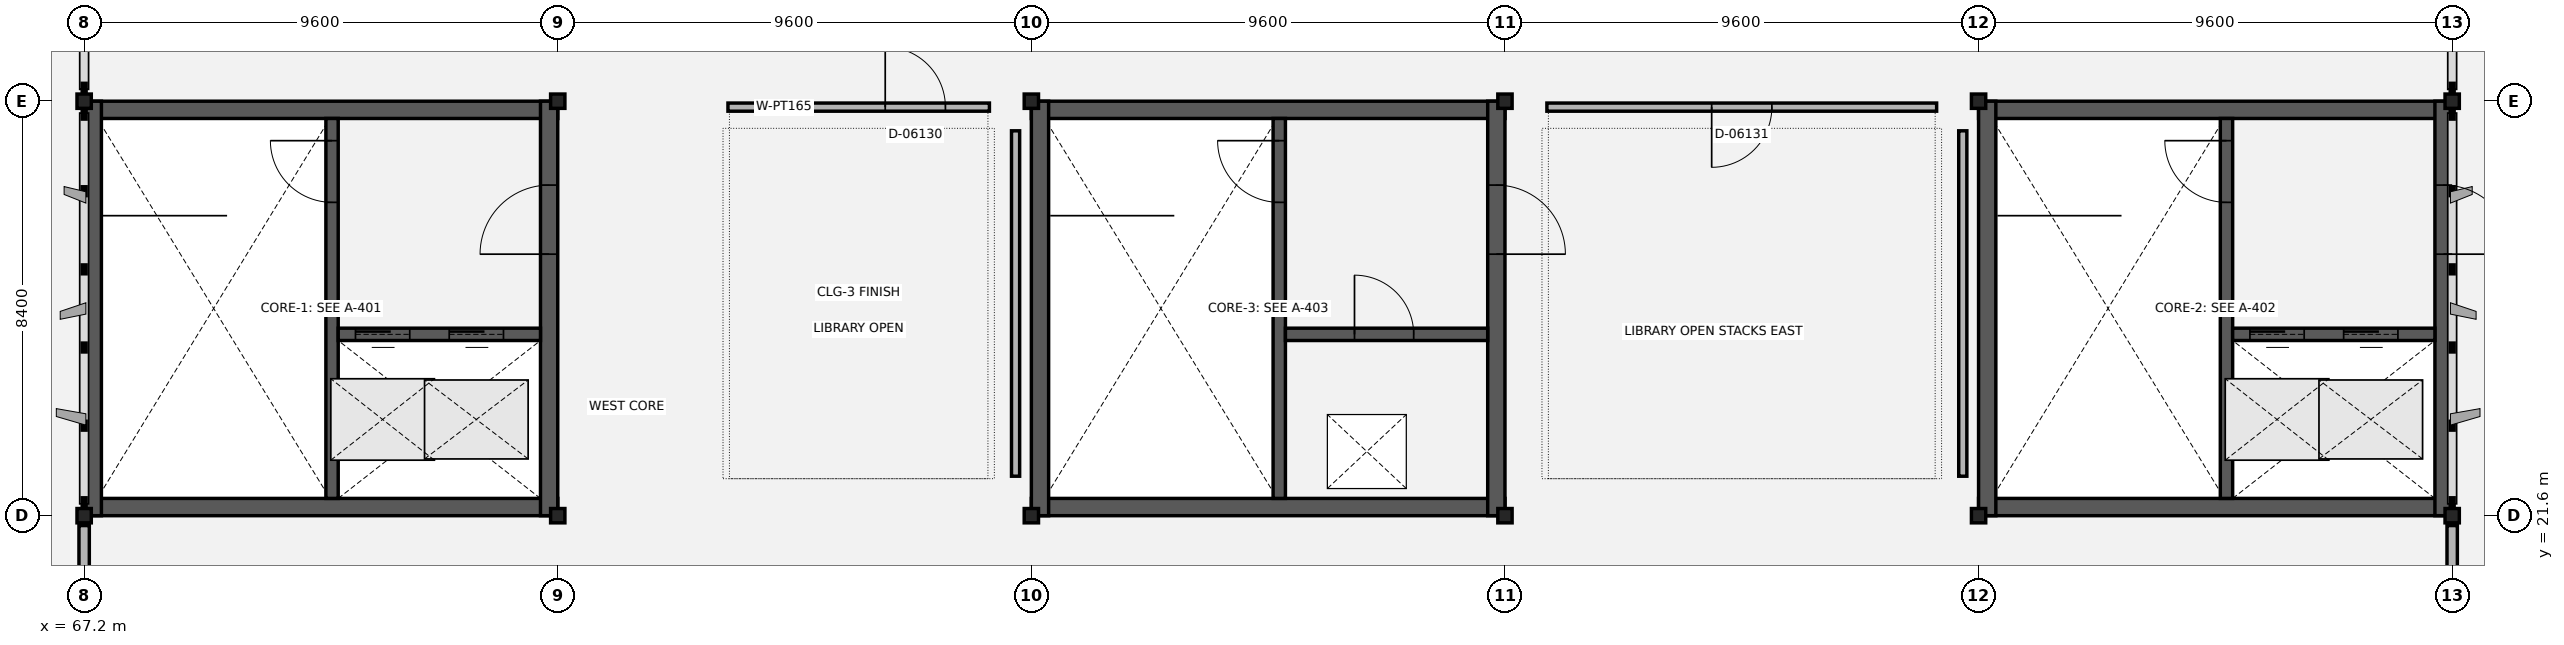
"""IFC4 building model, lengths in metres.
Left out: names, types, materials, properties, quantities, classifications, styles, units other than length and angle.
Written with IfcOpenShell. Run it as: python <this file> out.ifc"""

import sys

from ifc_helpers import new_model, si_unit, direction, frame, frame_2d, origin, origin_2d, place, context, subcontext, project, spatial, rectangle, extrude, element, fill, save


model = new_model("IFC4")
c1 = context("Model", 3, precision=1e-05, world=origin(), true_north=direction((0.0, 1.0)))
c2 = subcontext(c1, "Body", "Model", "MODEL_VIEW")
j1 = project(units=[si_unit("LENGTHUNIT", "METRE"), si_unit("PLANEANGLEUNIT", "RADIAN")], contexts=[c1])
p1 = place(None, origin())
s1 = spatial("IfcSite", under=j1, at=p1, CompositionType="ELEMENT")
p2 = place(p1, origin())
s2 = spatial("IfcBuilding", under=s1, at=p2, CompositionType="ELEMENT")
p3 = place(p2, frame((0.0, 0.0, 27.0)))
s3 = spatial("IfcBuildingStorey", under=s2, at=p3, CompositionType="ELEMENT", Elevation=27.0)
for number, where, z_axis, x_axis in (
    (1, (67.2, 21.6, 0.0), (0.0, 0.0, 1.0), (1.0, 0.0, 0.0)),
    (2, (67.2, 30.0, 0.0), (0.0, 0.0, 1.0), (1.0, 0.0, 0.0)),
    (3, (76.8, 21.6, 0.0), (0.0, 0.0, 1.0), (1.0, 0.0, 0.0)),
    (4, (76.8, 30.0, 0.0), (0.0, 0.0, 1.0), (1.0, 0.0, 0.0)),
    (5, (86.4, 21.6, 0.0), (0.0, 0.0, 1.0), (1.0, 0.0, 0.0)),
    (6, (86.4, 30.0, 0.0), (0.0, 0.0, 1.0), (1.0, 0.0, 0.0)),
    (7, (96.0, 21.6, 0.0), (0.0, 0.0, 1.0), (1.0, 0.0, 0.0)),
    (8, (96.0, 30.0, 0.0), (0.0, 0.0, 1.0), (1.0, 0.0, 0.0)),
    (9, (105.6, 21.6, 0.0), (0.0, 0.0, 1.0), (1.0, 0.0, 0.0)),
    (10, (105.6, 30.0, 0.0), (0.0, 0.0, 1.0), (1.0, 0.0, 0.0)),
    (11, (115.2, 21.6, 0.0), (0.0, 0.0, 1.0), (1.0, 0.0, 0.0)),
    (12, (115.2, 30.0, 0.0), (0.0, 0.0, 1.0), (1.0, 0.0, 0.0)),
):
    element("IfcColumn", number, at=place(p3, frame(where, z_axis=z_axis, x_axis=x_axis)), inside=s3, PredefinedType="COLUMN", context=c2, shape_type="SweptSolid", body=[
        extrude(rectangle(XDim=0.29, YDim=0.29, at=origin_2d()), origin(), (0.0, 0.0, 1.0), 4.8),
    ])
p4 = place(p3, frame((67.2, 21.4, 0.0), z_axis=(0.0, 0.0, 1.0), x_axis=(0.0, -1.0, 0.0)))
e13 = element("IfcWall", 13, at=p4, inside=s3, PredefinedType="SOLIDWALL", context=c2, shape_type="SweptSolid", body=[
    extrude(rectangle(XDim=8.0, YDim=0.21, at=frame_2d((4.0, 0.0))), origin(), (0.0, 0.0, 1.0), 3.965),
])
p5 = place(p4, frame((3.4, 0.0, 0.0)))
e14 = element("IfcOpeningElement", 14, at=p5, cuts=e13, PredefinedType="OPENING", context=c2, shape_type="SweptSolid", body=[
    extrude(rectangle(XDim=1.2, YDim=2.15, at=frame_2d((0.6, 1.075))), frame((0.0, 0.115, 0.0), z_axis=(0.0, -1.0, 0.0), x_axis=(1.0, 0.0, 0.0)), (0.0, 0.0, 1.0), 0.23),
])
p6 = place(p3, frame((115.2, 13.4, 0.0), z_axis=(0.0, 0.0, 1.0), x_axis=(0.0, 1.0, 0.0)))
e15 = element("IfcWall", 15, at=p6, inside=s3, PredefinedType="SOLIDWALL", context=c2, shape_type="SweptSolid", body=[
    extrude(rectangle(XDim=8.0, YDim=0.21, at=frame_2d((4.0, 0.0))), origin(), (0.0, 0.0, 1.0), 3.965),
])
p7 = place(p6, frame((3.4, 0.0, 0.0)))
e16 = element("IfcOpeningElement", 16, at=p7, cuts=e15, PredefinedType="OPENING", context=c2, shape_type="SweptSolid", body=[
    extrude(rectangle(XDim=1.2, YDim=2.15, at=frame_2d((0.6, 1.075))), frame((0.0, 0.115, 0.0), z_axis=(0.0, -1.0, 0.0), x_axis=(1.0, 0.0, 0.0)), (0.0, 0.0, 1.0), 0.23),
])
for number, where, z_axis, x_axis in (
    (17, (67.2, 29.825, 0.0), (0.0, 0.0, 1.0), (1.0, 0.0, 0.0)),
    (18, (67.2, 21.775, 0.0), (0.0, 0.0, 1.0), (1.0, 0.0, 0.0)),
):
    element("IfcWall", number, at=place(p3, frame(where, z_axis=z_axis, x_axis=x_axis)), inside=s3, PredefinedType="SHEAR", context=c2, shape_type="SweptSolid", body=[
        extrude(rectangle(XDim=9.6, YDim=0.35, at=frame_2d((4.8, 0.0))), origin(), (0.0, 0.0, 1.0), 4.565),
    ])
p8 = place(p3, frame((67.375, 21.6, 0.0), z_axis=(0.0, 0.0, 1.0), x_axis=(0.0, 1.0, 0.0)))
e19 = element("IfcWall", 19, at=p8, inside=s3, PredefinedType="SHEAR", context=c2, shape_type="SweptSolid", body=[
    extrude(rectangle(XDim=8.4, YDim=0.35, at=frame_2d((4.2, 0.0))), origin(), (0.0, 0.0, 1.0), 4.565),
])
p9 = place(p3, frame((76.625, 21.6, 0.0), z_axis=(0.0, 0.0, 1.0), x_axis=(0.0, 1.0, 0.0)))
e20 = element("IfcWall", 20, at=p9, inside=s3, PredefinedType="SHEAR", context=c2, shape_type="SweptSolid", body=[
    extrude(rectangle(XDim=8.4, YDim=0.35, at=frame_2d((4.2, 0.0))), origin(), (0.0, 0.0, 1.0), 4.565),
])
p10 = place(p9, frame((5.3, 0.0, 0.0)))
e21 = element("IfcOpeningElement", 21, at=p10, cuts=e20, PredefinedType="OPENING", context=c2, shape_type="SweptSolid", body=[
    extrude(rectangle(XDim=1.4, YDim=2.15, at=frame_2d((0.7, 1.075))), frame((0.0, 0.185, 0.0), z_axis=(0.0, -1.0, 0.0), x_axis=(1.0, 0.0, 0.0)), (0.0, 0.0, 1.0), 0.37),
])
p11 = place(p3, frame((72.225, 29.65, 0.0), z_axis=(0.0, 0.0, 1.0), x_axis=(0.0, -1.0, 0.0)))
e22 = element("IfcWall", 22, at=p11, inside=s3, PredefinedType="SHEAR", context=c2, shape_type="SweptSolid", body=[
    extrude(rectangle(XDim=7.7, YDim=0.25, at=frame_2d((3.85, 0.0))), origin(), (0.0, 0.0, 1.0), 4.565),
])
p12 = place(p11, frame((0.45, 0.0, 0.0)))
e23 = element("IfcOpeningElement", 23, at=p12, cuts=e22, PredefinedType="OPENING", context=c2, shape_type="SweptSolid", body=[
    extrude(rectangle(XDim=1.25, YDim=2.15, at=frame_2d((0.625, 1.075))), frame((0.0, 0.135, 0.0), z_axis=(0.0, -1.0, 0.0), x_axis=(1.0, 0.0, 0.0)), (0.0, 0.0, 1.0), 0.27),
])
p13 = place(p3, frame((72.35, 25.275, 0.0), z_axis=(0.0, 0.0, 1.0), x_axis=(1.0, 0.0, 0.0)))
e24 = element("IfcWall", 24, at=p13, inside=s3, PredefinedType="SHEAR", context=c2, shape_type="SweptSolid", body=[
    extrude(rectangle(XDim=4.1, YDim=0.25, at=frame_2d((2.05, 0.0))), origin(), (0.0, 0.0, 1.0), 4.565),
])
p14 = place(p13, frame((0.35, 0.0, 0.0)))
e25 = element("IfcOpeningElement", 25, at=p14, cuts=e24, PredefinedType="OPENING", context=c2, shape_type="SweptSolid", body=[
    extrude(rectangle(XDim=1.1, YDim=2.15, at=frame_2d((0.55, 1.075))), frame((0.0, 0.135, 0.0), z_axis=(0.0, -1.0, 0.0), x_axis=(1.0, 0.0, 0.0)), (0.0, 0.0, 1.0), 0.27),
])
p15 = place(p13, frame((2.25, 0.0, 0.0)))
e26 = element("IfcOpeningElement", 26, at=p15, cuts=e24, PredefinedType="OPENING", context=c2, shape_type="SweptSolid", body=[
    extrude(rectangle(XDim=1.1, YDim=2.15, at=frame_2d((0.55, 1.075))), frame((0.0, 0.135, 0.0), z_axis=(0.0, -1.0, 0.0), x_axis=(1.0, 0.0, 0.0)), (0.0, 0.0, 1.0), 0.27),
])
for number, where, z_axis, x_axis in (
    (27, (105.6, 29.825, 0.0), (0.0, 0.0, 1.0), (1.0, 0.0, 0.0)),
    (28, (105.6, 21.775, 0.0), (0.0, 0.0, 1.0), (1.0, 0.0, 0.0)),
):
    element("IfcWall", number, at=place(p3, frame(where, z_axis=z_axis, x_axis=x_axis)), inside=s3, PredefinedType="SHEAR", context=c2, shape_type="SweptSolid", body=[
        extrude(rectangle(XDim=9.6, YDim=0.35, at=frame_2d((4.8, 0.0))), origin(), (0.0, 0.0, 1.0), 4.565),
    ])
p16 = place(p3, frame((105.775, 21.6, 0.0), z_axis=(0.0, 0.0, 1.0), x_axis=(0.0, 1.0, 0.0)))
e29 = element("IfcWall", 29, at=p16, inside=s3, PredefinedType="SHEAR", context=c2, shape_type="SweptSolid", body=[
    extrude(rectangle(XDim=8.4, YDim=0.35, at=frame_2d((4.2, 0.0))), origin(), (0.0, 0.0, 1.0), 4.565),
])
p17 = place(p3, frame((115.025, 21.6, 0.0), z_axis=(0.0, 0.0, 1.0), x_axis=(0.0, 1.0, 0.0)))
e30 = element("IfcWall", 30, at=p17, inside=s3, PredefinedType="SHEAR", context=c2, shape_type="SweptSolid", body=[
    extrude(rectangle(XDim=8.4, YDim=0.35, at=frame_2d((4.2, 0.0))), origin(), (0.0, 0.0, 1.0), 4.565),
])
p18 = place(p17, frame((5.3, 0.0, 0.0)))
e31 = element("IfcOpeningElement", 31, at=p18, cuts=e30, PredefinedType="OPENING", context=c2, shape_type="SweptSolid", body=[
    extrude(rectangle(XDim=1.4, YDim=2.15, at=frame_2d((0.7, 1.075))), frame((0.0, 0.185, 0.0), z_axis=(0.0, -1.0, 0.0), x_axis=(1.0, 0.0, 0.0)), (0.0, 0.0, 1.0), 0.37),
])
p19 = place(p3, frame((110.625, 29.65, 0.0), z_axis=(0.0, 0.0, 1.0), x_axis=(0.0, -1.0, 0.0)))
e32 = element("IfcWall", 32, at=p19, inside=s3, PredefinedType="SHEAR", context=c2, shape_type="SweptSolid", body=[
    extrude(rectangle(XDim=7.7, YDim=0.25, at=frame_2d((3.85, 0.0))), origin(), (0.0, 0.0, 1.0), 4.565),
])
p20 = place(p19, frame((0.45, 0.0, 0.0)))
e33 = element("IfcOpeningElement", 33, at=p20, cuts=e32, PredefinedType="OPENING", context=c2, shape_type="SweptSolid", body=[
    extrude(rectangle(XDim=1.25, YDim=2.15, at=frame_2d((0.625, 1.075))), frame((0.0, 0.135, 0.0), z_axis=(0.0, -1.0, 0.0), x_axis=(1.0, 0.0, 0.0)), (0.0, 0.0, 1.0), 0.27),
])
p21 = place(p3, frame((110.75, 25.275, 0.0), z_axis=(0.0, 0.0, 1.0), x_axis=(1.0, 0.0, 0.0)))
e34 = element("IfcWall", 34, at=p21, inside=s3, PredefinedType="SHEAR", context=c2, shape_type="SweptSolid", body=[
    extrude(rectangle(XDim=4.1, YDim=0.25, at=frame_2d((2.05, 0.0))), origin(), (0.0, 0.0, 1.0), 4.565),
])
p22 = place(p21, frame((0.35, 0.0, 0.0)))
e35 = element("IfcOpeningElement", 35, at=p22, cuts=e34, PredefinedType="OPENING", context=c2, shape_type="SweptSolid", body=[
    extrude(rectangle(XDim=1.1, YDim=2.15, at=frame_2d((0.55, 1.075))), frame((0.0, 0.135, 0.0), z_axis=(0.0, -1.0, 0.0), x_axis=(1.0, 0.0, 0.0)), (0.0, 0.0, 1.0), 0.27),
])
p23 = place(p21, frame((2.25, 0.0, 0.0)))
e36 = element("IfcOpeningElement", 36, at=p23, cuts=e34, PredefinedType="OPENING", context=c2, shape_type="SweptSolid", body=[
    extrude(rectangle(XDim=1.1, YDim=2.15, at=frame_2d((0.55, 1.075))), frame((0.0, 0.135, 0.0), z_axis=(0.0, -1.0, 0.0), x_axis=(1.0, 0.0, 0.0)), (0.0, 0.0, 1.0), 0.27),
])
for number, where, z_axis, x_axis in (
    (37, (86.4, 29.825, 0.0), (0.0, 0.0, 1.0), (1.0, 0.0, 0.0)),
    (38, (86.4, 21.775, 0.0), (0.0, 0.0, 1.0), (1.0, 0.0, 0.0)),
):
    element("IfcWall", number, at=place(p3, frame(where, z_axis=z_axis, x_axis=x_axis)), inside=s3, PredefinedType="SHEAR", context=c2, shape_type="SweptSolid", body=[
        extrude(rectangle(XDim=9.6, YDim=0.35, at=frame_2d((4.8, 0.0))), origin(), (0.0, 0.0, 1.0), 4.565),
    ])
p24 = place(p3, frame((86.575, 21.6, 0.0), z_axis=(0.0, 0.0, 1.0), x_axis=(0.0, 1.0, 0.0)))
e39 = element("IfcWall", 39, at=p24, inside=s3, PredefinedType="SHEAR", context=c2, shape_type="SweptSolid", body=[
    extrude(rectangle(XDim=8.4, YDim=0.35, at=frame_2d((4.2, 0.0))), origin(), (0.0, 0.0, 1.0), 4.565),
])
p25 = place(p3, frame((95.825, 21.6, 0.0), z_axis=(0.0, 0.0, 1.0), x_axis=(0.0, 1.0, 0.0)))
e40 = element("IfcWall", 40, at=p25, inside=s3, PredefinedType="SHEAR", context=c2, shape_type="SweptSolid", body=[
    extrude(rectangle(XDim=8.4, YDim=0.35, at=frame_2d((4.2, 0.0))), origin(), (0.0, 0.0, 1.0), 4.565),
])
p26 = place(p25, frame((5.3, 0.0, 0.0)))
e41 = element("IfcOpeningElement", 41, at=p26, cuts=e40, PredefinedType="OPENING", context=c2, shape_type="SweptSolid", body=[
    extrude(rectangle(XDim=1.4, YDim=2.15, at=frame_2d((0.7, 1.075))), frame((0.0, 0.185, 0.0), z_axis=(0.0, -1.0, 0.0), x_axis=(1.0, 0.0, 0.0)), (0.0, 0.0, 1.0), 0.37),
])
p27 = place(p3, frame((91.425, 29.65, 0.0), z_axis=(0.0, 0.0, 1.0), x_axis=(0.0, -1.0, 0.0)))
e42 = element("IfcWall", 42, at=p27, inside=s3, PredefinedType="SHEAR", context=c2, shape_type="SweptSolid", body=[
    extrude(rectangle(XDim=7.7, YDim=0.25, at=frame_2d((3.85, 0.0))), origin(), (0.0, 0.0, 1.0), 4.565),
])
p28 = place(p27, frame((0.45, 0.0, 0.0)))
e43 = element("IfcOpeningElement", 43, at=p28, cuts=e42, PredefinedType="OPENING", context=c2, shape_type="SweptSolid", body=[
    extrude(rectangle(XDim=1.25, YDim=2.15, at=frame_2d((0.625, 1.075))), frame((0.0, 0.135, 0.0), z_axis=(0.0, -1.0, 0.0), x_axis=(1.0, 0.0, 0.0)), (0.0, 0.0, 1.0), 0.27),
])
p29 = place(p3, frame((91.55, 25.275, 0.0), z_axis=(0.0, 0.0, 1.0), x_axis=(1.0, 0.0, 0.0)))
e44 = element("IfcWall", 44, at=p29, inside=s3, PredefinedType="SHEAR", context=c2, shape_type="SweptSolid", body=[
    extrude(rectangle(XDim=4.1, YDim=0.25, at=frame_2d((2.05, 0.0))), origin(), (0.0, 0.0, 1.0), 4.565),
])
p30 = place(p29, frame((1.4, 0.0, 0.0)))
e45 = element("IfcOpeningElement", 45, at=p30, cuts=e44, PredefinedType="OPENING", context=c2, shape_type="SweptSolid", body=[
    extrude(rectangle(XDim=1.2, YDim=2.15, at=frame_2d((0.6, 1.075))), frame((0.0, 0.135, 0.0), z_axis=(0.0, -1.0, 0.0), x_axis=(1.0, 0.0, 0.0)), (0.0, 0.0, 1.0), 0.27),
])
p31 = place(p3, frame((80.25, 29.88, 0.0), z_axis=(0.0, 0.0, 1.0), x_axis=(1.0, 0.0, 0.0)))
e46 = element("IfcWall", 46, at=p31, inside=s3, PredefinedType="PARTITIONING", context=c2, shape_type="SweptSolid", body=[
    extrude(rectangle(XDim=5.3, YDim=0.165, at=frame_2d((2.65, 0.0))), origin(), (0.0, 0.0, 1.0), 3.945),
])
p32 = place(p31, frame((3.188, 0.0, 0.0)))
e47 = element("IfcOpeningElement", 47, at=p32, cuts=e46, PredefinedType="OPENING", context=c2, shape_type="SweptSolid", body=[
    extrude(rectangle(XDim=1.22, YDim=2.15, at=frame_2d((0.61, 1.075))), frame((0.0, 0.093, 0.0), z_axis=(0.0, -1.0, 0.0), x_axis=(1.0, 0.0, 0.0)), (0.0, 0.0, 1.0), 0.185),
])
p33 = place(p3, frame((86.08, 22.4, 0.0), z_axis=(0.0, 0.0, 1.0), x_axis=(0.0, 1.0, 0.0)))
e48 = element("IfcWall", 48, at=p33, inside=s3, PredefinedType="PARTITIONING", context=c2, shape_type="SweptSolid", body=[
    extrude(rectangle(XDim=7.0, YDim=0.165, at=frame_2d((3.5, 0.0))), origin(), (0.0, 0.0, 1.0), 3.945),
])
p34 = place(p3, frame((96.85, 29.88, 0.0), z_axis=(0.0, 0.0, 1.0), x_axis=(1.0, 0.0, 0.0)))
e49 = element("IfcWall", 49, at=p34, inside=s3, PredefinedType="PARTITIONING", context=c2, shape_type="SweptSolid", body=[
    extrude(rectangle(XDim=7.9, YDim=0.165, at=frame_2d((3.95, 0.0))), origin(), (0.0, 0.0, 1.0), 3.945),
])
p35 = place(p34, frame((3.34, 0.0, 0.0)))
e50 = element("IfcOpeningElement", 50, at=p35, cuts=e49, PredefinedType="OPENING", context=c2, shape_type="SweptSolid", body=[
    extrude(rectangle(XDim=1.22, YDim=2.15, at=frame_2d((0.61, 1.075))), frame((0.0, 0.093, 0.0), z_axis=(0.0, -1.0, 0.0), x_axis=(1.0, 0.0, 0.0)), (0.0, 0.0, 1.0), 0.185),
])
p36 = place(p3, frame((105.28, 22.4, 0.0), z_axis=(0.0, 0.0, 1.0), x_axis=(0.0, 1.0, 0.0)))
e51 = element("IfcWall", 51, at=p36, inside=s3, PredefinedType="PARTITIONING", context=c2, shape_type="SweptSolid", body=[
    extrude(rectangle(XDim=7.0, YDim=0.165, at=frame_2d((3.5, 0.0))), origin(), (0.0, 0.0, 1.0), 3.945),
])
p37 = place(p12, origin())
e52 = element("IfcDoor", 52, at=p37, inside=s3, OperationType="SINGLE_SWING_RIGHT", PredefinedType="DOOR", context=c2, shape_type="SweptSolid", body=[
    extrude(rectangle(XDim=1.25, YDim=2.15, at=frame_2d((0.625, 1.075))), frame((0.0, 0.025, 0.0), z_axis=(0.0, -1.0, 0.0), x_axis=(1.0, 0.0, 0.0)), (0.0, 0.0, 1.0), 0.05),
])
fill(e23, e52)
p38 = place(p14, origin())
e53 = element("IfcDoor", 53, at=p38, inside=s3, OperationType="SLIDING_TO_LEFT", PredefinedType="DOOR", context=c2, shape_type="SweptSolid", body=[
    extrude(rectangle(XDim=1.1, YDim=2.15, at=frame_2d((0.55, 1.075))), frame((0.0, 0.025, 0.0), z_axis=(0.0, -1.0, 0.0), x_axis=(1.0, 0.0, 0.0)), (0.0, 0.0, 1.0), 0.05),
])
fill(e25, e53)
p39 = place(p15, origin())
e54 = element("IfcDoor", 54, at=p39, inside=s3, OperationType="SLIDING_TO_LEFT", PredefinedType="DOOR", context=c2, shape_type="SweptSolid", body=[
    extrude(rectangle(XDim=1.1, YDim=2.15, at=frame_2d((0.55, 1.075))), frame((0.0, 0.025, 0.0), z_axis=(0.0, -1.0, 0.0), x_axis=(1.0, 0.0, 0.0)), (0.0, 0.0, 1.0), 0.05),
])
fill(e26, e54)
p40 = place(p10, origin())
e55 = element("IfcDoor", 55, at=p40, inside=s3, OperationType="SINGLE_SWING_LEFT", PredefinedType="DOOR", context=c2, shape_type="SweptSolid", body=[
    extrude(rectangle(XDim=1.4, YDim=2.15, at=frame_2d((0.7, 1.075))), frame((0.0, 0.025, 0.0), z_axis=(0.0, -1.0, 0.0), x_axis=(1.0, 0.0, 0.0)), (0.0, 0.0, 1.0), 0.05),
])
fill(e21, e55)
p41 = place(p20, origin())
e56 = element("IfcDoor", 56, at=p41, inside=s3, OperationType="SINGLE_SWING_RIGHT", PredefinedType="DOOR", context=c2, shape_type="SweptSolid", body=[
    extrude(rectangle(XDim=1.25, YDim=2.15, at=frame_2d((0.625, 1.075))), frame((0.0, 0.025, 0.0), z_axis=(0.0, -1.0, 0.0), x_axis=(1.0, 0.0, 0.0)), (0.0, 0.0, 1.0), 0.05),
])
fill(e33, e56)
p42 = place(p22, origin())
e57 = element("IfcDoor", 57, at=p42, inside=s3, OperationType="SLIDING_TO_LEFT", PredefinedType="DOOR", context=c2, shape_type="SweptSolid", body=[
    extrude(rectangle(XDim=1.1, YDim=2.15, at=frame_2d((0.55, 1.075))), frame((0.0, 0.025, 0.0), z_axis=(0.0, -1.0, 0.0), x_axis=(1.0, 0.0, 0.0)), (0.0, 0.0, 1.0), 0.05),
])
fill(e35, e57)
p43 = place(p23, origin())
e58 = element("IfcDoor", 58, at=p43, inside=s3, OperationType="SLIDING_TO_LEFT", PredefinedType="DOOR", context=c2, shape_type="SweptSolid", body=[
    extrude(rectangle(XDim=1.1, YDim=2.15, at=frame_2d((0.55, 1.075))), frame((0.0, 0.025, 0.0), z_axis=(0.0, -1.0, 0.0), x_axis=(1.0, 0.0, 0.0)), (0.0, 0.0, 1.0), 0.05),
])
fill(e36, e58)
p44 = place(p18, origin())
e59 = element("IfcDoor", 59, at=p44, inside=s3, OperationType="SINGLE_SWING_RIGHT", PredefinedType="DOOR", context=c2, shape_type="SweptSolid", body=[
    extrude(rectangle(XDim=1.4, YDim=2.15, at=frame_2d((0.7, 1.075))), frame((0.0, 0.025, 0.0), z_axis=(0.0, -1.0, 0.0), x_axis=(1.0, 0.0, 0.0)), (0.0, 0.0, 1.0), 0.05),
])
fill(e31, e59)
p45 = place(p28, origin())
e60 = element("IfcDoor", 60, at=p45, inside=s3, OperationType="SINGLE_SWING_RIGHT", PredefinedType="DOOR", context=c2, shape_type="SweptSolid", body=[
    extrude(rectangle(XDim=1.25, YDim=2.15, at=frame_2d((0.625, 1.075))), frame((0.0, 0.025, 0.0), z_axis=(0.0, -1.0, 0.0), x_axis=(1.0, 0.0, 0.0)), (0.0, 0.0, 1.0), 0.05),
])
fill(e43, e60)
p46 = place(p30, origin())
e61 = element("IfcDoor", 61, at=p46, inside=s3, OperationType="SINGLE_SWING_LEFT", PredefinedType="DOOR", context=c2, shape_type="SweptSolid", body=[
    extrude(rectangle(XDim=1.2, YDim=2.15, at=frame_2d((0.6, 1.075))), frame((0.0, 0.025, 0.0), z_axis=(0.0, -1.0, 0.0), x_axis=(1.0, 0.0, 0.0)), (0.0, 0.0, 1.0), 0.05),
])
fill(e45, e61)
p47 = place(p26, origin())
e62 = element("IfcDoor", 62, at=p47, inside=s3, OperationType="SINGLE_SWING_RIGHT", PredefinedType="DOOR", context=c2, shape_type="SweptSolid", body=[
    extrude(rectangle(XDim=1.4, YDim=2.15, at=frame_2d((0.7, 1.075))), frame((0.0, 0.025, 0.0), z_axis=(0.0, -1.0, 0.0), x_axis=(1.0, 0.0, 0.0)), (0.0, 0.0, 1.0), 0.05),
])
fill(e41, e62)
p48 = place(p32, origin())
e63 = element("IfcDoor", 63, at=p48, inside=s3, OperationType="SINGLE_SWING_LEFT", PredefinedType="DOOR", context=c2, shape_type="SweptSolid", body=[
    extrude(rectangle(XDim=1.22, YDim=2.15, at=frame_2d((0.61, 1.075))), frame((0.0, 0.025, 0.0), z_axis=(0.0, -1.0, 0.0), x_axis=(1.0, 0.0, 0.0)), (0.0, 0.0, 1.0), 0.05),
])
fill(e47, e63)
p49 = place(p35, origin())
e64 = element("IfcDoor", 64, at=p49, inside=s3, OperationType="SINGLE_SWING_RIGHT", PredefinedType="DOOR", context=c2, shape_type="SweptSolid", body=[
    extrude(rectangle(XDim=1.22, YDim=2.15, at=frame_2d((0.61, 1.075))), frame((0.0, 0.025, 0.0), z_axis=(0.0, -1.0, 0.0), x_axis=(1.0, 0.0, 0.0)), (0.0, 0.0, 1.0), 0.05),
])
fill(e50, e64)
save(model, sys.argv[1])
